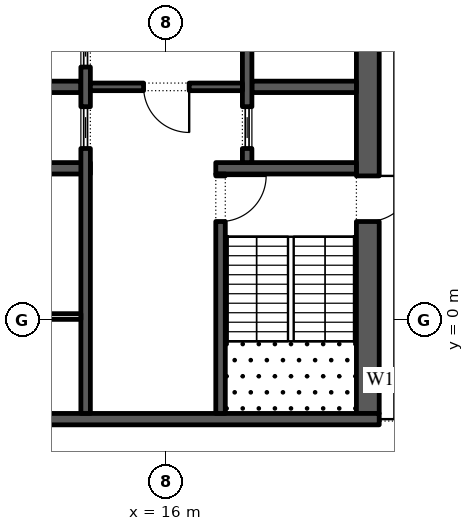
"""IFC4 building model, lengths in metres.
Left out: names, types, materials, properties, quantities, classifications, styles, units other than length and angle.
Written with IfcOpenShell. Run it as: python <this file> out.ifc"""

import sys

from ifc_helpers import new_model, si_unit, direction, frame, frame_2d, origin, place, context, subcontext, project, spatial, rectangle, extrude, element, fill, save


model = new_model("IFC4")
c1 = context("Model", 3, precision=1e-05, world=origin(), true_north=direction((0.0, 1.0)))
c2 = subcontext(c1, "Body", "Model", "MODEL_VIEW")
j1 = project(units=[si_unit("LENGTHUNIT", "METRE"), si_unit("PLANEANGLEUNIT", "RADIAN")], contexts=[c1])
p1 = place(None, origin())
s1 = spatial("IfcSite", under=j1, at=p1, CompositionType="ELEMENT")
p2 = place(p1, origin())
s2 = spatial("IfcBuilding", under=s1, at=p2, CompositionType="ELEMENT")
p3 = place(p2, frame((0.0, 0.0, 251.4)))
s3 = spatial("IfcBuildingStorey", under=s2, at=p3, CompositionType="ELEMENT", Elevation=251.4)
p4 = place(p3, frame((21.359, -11.678, 0.0), z_axis=(0.0, 0.0, 1.0), x_axis=(0.224949198343, 0.974370493275, 0.0)))
e1 = element("IfcWall", 1, at=p4, inside=s3, PredefinedType="STANDARD", context=c2, shape_type="SweptSolid", body=[
    extrude(rectangle(XDim=49.5, YDim=0.3, at=frame_2d((24.75, 0.0))), origin(), (0.0, 0.0, 1.0), 4.0),
])
p5 = place(p4, frame((1.157, 0.0, 0.45)))
e2 = element("IfcOpeningElement", 2, at=p5, cuts=e1, PredefinedType="OPENING", context=c2, shape_type="SweptSolid", body=[
    extrude(rectangle(XDim=4.5, YDim=3.05, at=frame_2d((2.25, 1.525))), frame((0.0, 0.16, 0.0), z_axis=(0.0, -1.0, 0.0), x_axis=(1.0, 0.0, 0.0)), (0.0, 0.0, 1.0), 0.32),
])
p6 = place(p4, frame((8.121, 0.0, 0.45)))
e3 = element("IfcOpeningElement", 3, at=p6, cuts=e1, PredefinedType="OPENING", context=c2, shape_type="SweptSolid", body=[
    extrude(rectangle(XDim=4.5, YDim=3.05, at=frame_2d((2.25, 1.525))), frame((0.0, 0.16, 0.0), z_axis=(0.0, -1.0, 0.0), x_axis=(1.0, 0.0, 0.0)), (0.0, 0.0, 1.0), 0.32),
])
p7 = place(p4, frame((15.236, 0.0, 0.45)))
e4 = element("IfcOpeningElement", 4, at=p7, cuts=e1, PredefinedType="OPENING", context=c2, shape_type="SweptSolid", body=[
    extrude(rectangle(XDim=4.5, YDim=3.05, at=frame_2d((2.25, 1.525))), frame((0.0, 0.16, 0.0), z_axis=(0.0, -1.0, 0.0), x_axis=(1.0, 0.0, 0.0)), (0.0, 0.0, 1.0), 0.32),
])
p8 = place(p4, frame((22.35, 0.0, 0.45)))
e5 = element("IfcOpeningElement", 5, at=p8, cuts=e1, PredefinedType="OPENING", context=c2, shape_type="SweptSolid", body=[
    extrude(rectangle(XDim=4.5, YDim=3.05, at=frame_2d((2.25, 1.525))), frame((0.0, 0.16, 0.0), z_axis=(0.0, -1.0, 0.0), x_axis=(1.0, 0.0, 0.0)), (0.0, 0.0, 1.0), 0.32),
])
p9 = place(p4, frame((29.464, 0.0, 0.45)))
e6 = element("IfcOpeningElement", 6, at=p9, cuts=e1, PredefinedType="OPENING", context=c2, shape_type="SweptSolid", body=[
    extrude(rectangle(XDim=4.5, YDim=2.95, at=frame_2d((2.25, 1.475))), frame((0.0, 0.16, 0.0), z_axis=(0.0, -1.0, 0.0), x_axis=(1.0, 0.0, 0.0)), (0.0, 0.0, 1.0), 0.32),
])
p10 = place(p4, frame((37.628, 0.0, 0.0)))
e7 = element("IfcOpeningElement", 7, at=p10, cuts=e1, PredefinedType="OPENING", context=c2, shape_type="SweptSolid", body=[
    extrude(rectangle(XDim=2.4, YDim=3.325, at=frame_2d((1.2, 1.663))), frame((0.0, 0.16, 0.0), z_axis=(0.0, -1.0, 0.0), x_axis=(1.0, 0.0, 0.0)), (0.0, 0.0, 1.0), 0.32),
])
p11 = place(p4, frame((43.693, 0.0, 0.45)))
e8 = element("IfcOpeningElement", 8, at=p11, cuts=e1, PredefinedType="OPENING", context=c2, shape_type="SweptSolid", body=[
    extrude(rectangle(XDim=4.5, YDim=3.05, at=frame_2d((2.25, 1.525))), frame((0.0, 0.16, 0.0), z_axis=(0.0, -1.0, 0.0), x_axis=(1.0, 0.0, 0.0)), (0.0, 0.0, 1.0), 0.32),
])
p12 = place(p3, frame((21.3, -2.45, 0.0), z_axis=(0.0, 0.0, 1.0), x_axis=(0.0, 1.0, 0.0)))
e9 = element("IfcWall", 9, at=p12, inside=s3, PredefinedType="SHEAR", context=c2, shape_type="SweptSolid", body=[
    extrude(rectangle(XDim=27.9, YDim=0.6, at=frame_2d((13.95, 0.0))), origin(), (0.0, 0.0, 1.0), 4.0),
])
p13 = place(p12, frame((5.05, 0.0, 0.0)))
e10 = element("IfcOpeningElement", 10, at=p13, cuts=e9, PredefinedType="OPENING", context=c2, shape_type="SweptSolid", body=[
    extrude(rectangle(XDim=1.2, YDim=2.1, at=frame_2d((0.6, 1.05))), frame((0.0, 0.31, 0.0), z_axis=(0.0, -1.0, 0.0), x_axis=(1.0, 0.0, 0.0)), (0.0, 0.0, 1.0), 0.62),
])
p14 = place(p12, frame((21.65, 0.0, 0.0)))
e11 = element("IfcOpeningElement", 11, at=p14, cuts=e9, PredefinedType="OPENING", context=c2, shape_type="SweptSolid", body=[
    extrude(rectangle(XDim=1.2, YDim=2.1, at=frame_2d((0.6, 1.05))), frame((0.0, 0.31, 0.0), z_axis=(0.0, -1.0, 0.0), x_axis=(1.0, 0.0, 0.0)), (0.0, 0.0, 1.0), 0.62),
])
p15 = place(p3, frame((10.4, -2.6, 0.0), z_axis=(0.0, 0.0, 1.0), x_axis=(1.0, 0.0, 0.0)))
e12 = element("IfcWall", 12, at=p15, inside=s3, PredefinedType="SHEAR", context=c2, shape_type="SweptSolid", body=[
    extrude(rectangle(XDim=11.2, YDim=0.3, at=frame_2d((5.6, 0.0))), origin(), (0.0, 0.0, 1.0), 4.0),
])
p16 = place(p3, frame((17.3, 4.0, 0.0), z_axis=(0.0, 0.0, 1.0), x_axis=(1.0, 0.0, 0.0)))
e13 = element("IfcWall", 13, at=p16, inside=s3, PredefinedType="SHEAR", context=c2, shape_type="SweptSolid", body=[
    extrude(rectangle(XDim=3.7, YDim=0.3, at=frame_2d((1.85, 0.0))), origin(), (0.0, 0.0, 1.0), 4.0),
])
p17 = place(p3, frame((17.425, -2.45, 0.0), z_axis=(0.0, 0.0, 1.0), x_axis=(0.0, 1.0, 0.0)))
e14 = element("IfcWall", 14, at=p17, inside=s3, PredefinedType="SHEAR", context=c2, shape_type="SweptSolid", body=[
    extrude(rectangle(XDim=6.3, YDim=0.25, at=frame_2d((3.15, 0.0))), origin(), (0.0, 0.0, 1.0), 4.0),
])
p18 = place(p17, frame((5.05, 0.0, 0.0)))
e15 = element("IfcOpeningElement", 15, at=p18, cuts=e14, PredefinedType="OPENING", context=c2, shape_type="SweptSolid", body=[
    extrude(rectangle(XDim=1.2, YDim=2.1, at=frame_2d((0.6, 1.05))), frame((0.0, 0.135, 0.0), z_axis=(0.0, -1.0, 0.0), x_axis=(1.0, 0.0, 0.0)), (0.0, 0.0, 1.0), 0.27),
])
p19 = place(p3, frame((18.25, 6.143, 0.0), z_axis=(0.0, 0.0, 1.0), x_axis=(1.0, 0.0, 0.0)))
e16 = element("IfcWall", 16, at=p19, inside=s3, PredefinedType="SHEAR", context=c2, shape_type="SweptSolid", body=[
    extrude(rectangle(XDim=2.75, YDim=0.3, at=frame_2d((1.375, 0.0))), origin(), (0.0, 0.0, 1.0), 4.0),
])
p20 = place(p3, frame((18.125, 4.15, 0.0), z_axis=(0.0, 0.0, 1.0), x_axis=(0.0, 1.0, 0.0)))
e17 = element("IfcWall", 17, at=p20, inside=s3, PredefinedType="SHEAR", context=c2, shape_type="SweptSolid", body=[
    extrude(rectangle(XDim=14.7, YDim=0.25, at=frame_2d((7.35, 0.0))), origin(), (0.0, 0.0, 1.0), 4.0),
])
p21 = place(p20, frame((4.296, 0.0, 0.0)))
e18 = element("IfcOpeningElement", 18, at=p21, cuts=e17, PredefinedType="OPENING", context=c2, shape_type="SweptSolid", body=[
    extrude(rectangle(XDim=0.9, YDim=2.1, at=frame_2d((0.45, 1.05))), frame((0.0, 0.135, 0.0), z_axis=(0.0, -1.0, 0.0), x_axis=(1.0, 0.0, 0.0)), (0.0, 0.0, 1.0), 0.27),
])
p22 = place(p20, frame((9.504, 0.0, 0.0)))
e19 = element("IfcOpeningElement", 19, at=p22, cuts=e17, PredefinedType="OPENING", context=c2, shape_type="SweptSolid", body=[
    extrude(rectangle(XDim=0.9, YDim=2.1, at=frame_2d((0.45, 1.05))), frame((0.0, 0.135, 0.0), z_axis=(0.0, -1.0, 0.0), x_axis=(1.0, 0.0, 0.0)), (0.0, 0.0, 1.0), 0.27),
])
p23 = place(p20, frame((0.371, 0.0, 0.0)))
e20 = element("IfcOpeningElement", 20, at=p23, cuts=e17, PredefinedType="OPENING", context=c2, shape_type="SweptSolid", body=[
    extrude(rectangle(XDim=1.1, YDim=2.1, at=frame_2d((0.55, 1.05))), frame((0.0, 0.135, 0.0), z_axis=(0.0, -1.0, 0.0), x_axis=(1.0, 0.0, 0.0)), (0.0, 0.0, 1.0), 0.27),
])
p24 = place(p20, frame((13.229, 0.0, 0.0)))
e21 = element("IfcOpeningElement", 21, at=p24, cuts=e17, PredefinedType="OPENING", context=c2, shape_type="SweptSolid", body=[
    extrude(rectangle(XDim=1.1, YDim=2.1, at=frame_2d((0.55, 1.05))), frame((0.0, 0.135, 0.0), z_axis=(0.0, -1.0, 0.0), x_axis=(1.0, 0.0, 0.0)), (0.0, 0.0, 1.0), 0.27),
])
p25 = place(p3, frame((11.0, 4.0, 0.0), z_axis=(0.0, 0.0, 1.0), x_axis=(1.0, 0.0, 0.0)))
e22 = element("IfcWall", 22, at=p25, inside=s3, PredefinedType="SHEAR", context=c2, shape_type="SweptSolid", body=[
    extrude(rectangle(XDim=3.0, YDim=0.3, at=frame_2d((1.5, 0.0))), origin(), (0.0, 0.0, 1.0), 4.0),
])
p26 = place(p3, frame((11.0, 6.143, 0.0), z_axis=(0.0, 0.0, 1.0), x_axis=(1.0, 0.0, 0.0)))
e23 = element("IfcWall", 23, at=p26, inside=s3, PredefinedType="SHEAR", context=c2, shape_type="SweptSolid", body=[
    extrude(rectangle(XDim=2.75, YDim=0.3, at=frame_2d((1.375, 0.0))), origin(), (0.0, 0.0, 1.0), 4.0),
])
p27 = place(p3, frame((13.875, -2.45, 0.0), z_axis=(0.0, 0.0, 1.0), x_axis=(0.0, 1.0, 0.0)))
e24 = element("IfcWall", 24, at=p27, inside=s3, PredefinedType="SHEAR", context=c2, shape_type="SweptSolid", body=[
    extrude(rectangle(XDim=21.3, YDim=0.25, at=frame_2d((10.65, 0.0))), origin(), (0.0, 0.0, 1.0), 4.0),
])
p28 = place(p27, frame((17.786, 0.0, 0.0)))
e25 = element("IfcOpeningElement", 25, at=p28, cuts=e24, PredefinedType="OPENING", context=c2, shape_type="SweptSolid", body=[
    extrude(rectangle(XDim=0.9, YDim=2.1, at=frame_2d((0.45, 1.05))), frame((0.0, 0.135, 0.0), z_axis=(0.0, -1.0, 0.0), x_axis=(1.0, 0.0, 0.0)), (0.0, 0.0, 1.0), 0.27),
])
p29 = place(p27, frame((6.971, 0.0, 0.0)))
e26 = element("IfcOpeningElement", 26, at=p29, cuts=e24, PredefinedType="OPENING", context=c2, shape_type="SweptSolid", body=[
    extrude(rectangle(XDim=1.1, YDim=2.1, at=frame_2d((0.55, 1.05))), frame((0.0, 0.135, 0.0), z_axis=(0.0, -1.0, 0.0), x_axis=(1.0, 0.0, 0.0)), (0.0, 0.0, 1.0), 0.27),
])
p30 = place(p27, frame((9.114, 0.0, 0.0)))
e27 = element("IfcOpeningElement", 27, at=p30, cuts=e24, PredefinedType="OPENING", context=c2, shape_type="SweptSolid", body=[
    extrude(rectangle(XDim=1.1, YDim=2.1, at=frame_2d((0.55, 1.05))), frame((0.0, 0.135, 0.0), z_axis=(0.0, -1.0, 0.0), x_axis=(1.0, 0.0, 0.0)), (0.0, 0.0, 1.0), 0.27),
])
p31 = place(p27, frame((11.257, 0.0, 0.0)))
e28 = element("IfcOpeningElement", 28, at=p31, cuts=e24, PredefinedType="OPENING", context=c2, shape_type="SweptSolid", body=[
    extrude(rectangle(XDim=1.1, YDim=2.1, at=frame_2d((0.55, 1.05))), frame((0.0, 0.135, 0.0), z_axis=(0.0, -1.0, 0.0), x_axis=(1.0, 0.0, 0.0)), (0.0, 0.0, 1.0), 0.27),
])
p32 = place(p27, frame((13.4, 0.0, 0.0)))
e29 = element("IfcOpeningElement", 29, at=p32, cuts=e24, PredefinedType="OPENING", context=c2, shape_type="SweptSolid", body=[
    extrude(rectangle(XDim=1.1, YDim=2.1, at=frame_2d((0.55, 1.05))), frame((0.0, 0.135, 0.0), z_axis=(0.0, -1.0, 0.0), x_axis=(1.0, 0.0, 0.0)), (0.0, 0.0, 1.0), 0.27),
])
p33 = place(p3, frame((14.0, 6.143, 0.0), z_axis=(0.0, 0.0, 1.0), x_axis=(1.0, 0.0, 0.0)))
e30 = element("IfcWall", 30, at=p33, inside=s3, PredefinedType="SHEAR", context=c2, shape_type="SweptSolid", body=[
    extrude(rectangle(XDim=4.0, YDim=0.2, at=frame_2d((2.0, 0.0))), origin(), (0.0, 0.0, 1.0), 4.0),
])
p34 = place(p33, frame((1.4, 0.0, 0.0)))
e31 = element("IfcOpeningElement", 31, at=p34, cuts=e30, PredefinedType="OPENING", context=c2, shape_type="SweptSolid", body=[
    extrude(rectangle(XDim=1.2, YDim=2.1, at=frame_2d((0.6, 1.05))), frame((0.0, 0.11, 0.0), z_axis=(0.0, -1.0, 0.0), x_axis=(1.0, 0.0, 0.0)), (0.0, 0.0, 1.0), 0.22),
])
p35 = place(p3, frame((11.0, 0.1, 0.0), z_axis=(0.0, 0.0, 1.0), x_axis=(1.0, 0.0, 0.0)))
e32 = element("IfcWall", 32, at=p35, inside=s3, PredefinedType="PARTITIONING", context=c2, shape_type="SweptSolid", body=[
    extrude(rectangle(XDim=2.75, YDim=0.15, at=frame_2d((1.375, 0.0))), origin(), (0.0, 0.0, 1.0), 4.0),
])
p36 = place(p23, origin())
e33 = element("IfcDoor", 33, at=p36, inside=s3, OperationType="SLIDING_TO_LEFT", PredefinedType="DOOR", context=c2, shape_type="SweptSolid", body=[
    extrude(rectangle(XDim=1.1, YDim=2.1, at=frame_2d((0.55, 1.05))), frame((0.0, 0.025, 0.0), z_axis=(0.0, -1.0, 0.0), x_axis=(1.0, 0.0, 0.0)), (0.0, 0.0, 1.0), 0.05),
])
fill(e20, e33)
p37 = place(p29, origin())
e34 = element("IfcDoor", 34, at=p37, inside=s3, OperationType="SLIDING_TO_LEFT", PredefinedType="DOOR", context=c2, shape_type="SweptSolid", body=[
    extrude(rectangle(XDim=1.1, YDim=2.1, at=frame_2d((0.55, 1.05))), frame((0.0, 0.025, 0.0), z_axis=(0.0, -1.0, 0.0), x_axis=(1.0, 0.0, 0.0)), (0.0, 0.0, 1.0), 0.05),
])
fill(e26, e34)
p38 = place(p30, origin())
e35 = element("IfcDoor", 35, at=p38, inside=s3, OperationType="SLIDING_TO_LEFT", PredefinedType="DOOR", context=c2, shape_type="SweptSolid", body=[
    extrude(rectangle(XDim=1.1, YDim=2.1, at=frame_2d((0.55, 1.05))), frame((0.0, 0.025, 0.0), z_axis=(0.0, -1.0, 0.0), x_axis=(1.0, 0.0, 0.0)), (0.0, 0.0, 1.0), 0.05),
])
fill(e27, e35)
p39 = place(p34, frame((1.2, 0.0, 0.0), z_axis=(0.0, 0.0, 1.0), x_axis=(-1.0, 0.0, 0.0)))
e36 = element("IfcDoor", 36, at=p39, inside=s3, OperationType="SINGLE_SWING_RIGHT", PredefinedType="DOOR", context=c2, shape_type="SweptSolid", body=[
    extrude(rectangle(XDim=1.2, YDim=2.1, at=frame_2d((0.6, 1.05))), frame((0.0, 0.025, 0.0), z_axis=(0.0, -1.0, 0.0), x_axis=(1.0, 0.0, 0.0)), (0.0, 0.0, 1.0), 0.05),
])
fill(e31, e36)
p40 = place(p18, frame((1.2, 0.0, 0.0), z_axis=(0.0, 0.0, 1.0), x_axis=(-1.0, 0.0, 0.0)))
e37 = element("IfcDoor", 37, at=p40, inside=s3, OperationType="SINGLE_SWING_RIGHT", PredefinedType="DOOR", context=c2, shape_type="SweptSolid", body=[
    extrude(rectangle(XDim=1.2, YDim=2.1, at=frame_2d((0.6, 1.05))), frame((0.0, 0.025, 0.0), z_axis=(0.0, -1.0, 0.0), x_axis=(1.0, 0.0, 0.0)), (0.0, 0.0, 1.0), 0.05),
])
fill(e15, e37)
p41 = place(p13, frame((1.2, 0.0, 0.0), z_axis=(0.0, 0.0, 1.0), x_axis=(-1.0, 0.0, 0.0)))
e38 = element("IfcDoor", 38, at=p41, inside=s3, OperationType="SINGLE_SWING_RIGHT", PredefinedType="DOOR", context=c2, shape_type="SweptSolid", body=[
    extrude(rectangle(XDim=1.2, YDim=2.1, at=frame_2d((0.6, 1.05))), frame((0.0, 0.025, 0.0), z_axis=(0.0, -1.0, 0.0), x_axis=(1.0, 0.0, 0.0)), (0.0, 0.0, 1.0), 0.05),
])
fill(e10, e38)
save(model, sys.argv[1])
